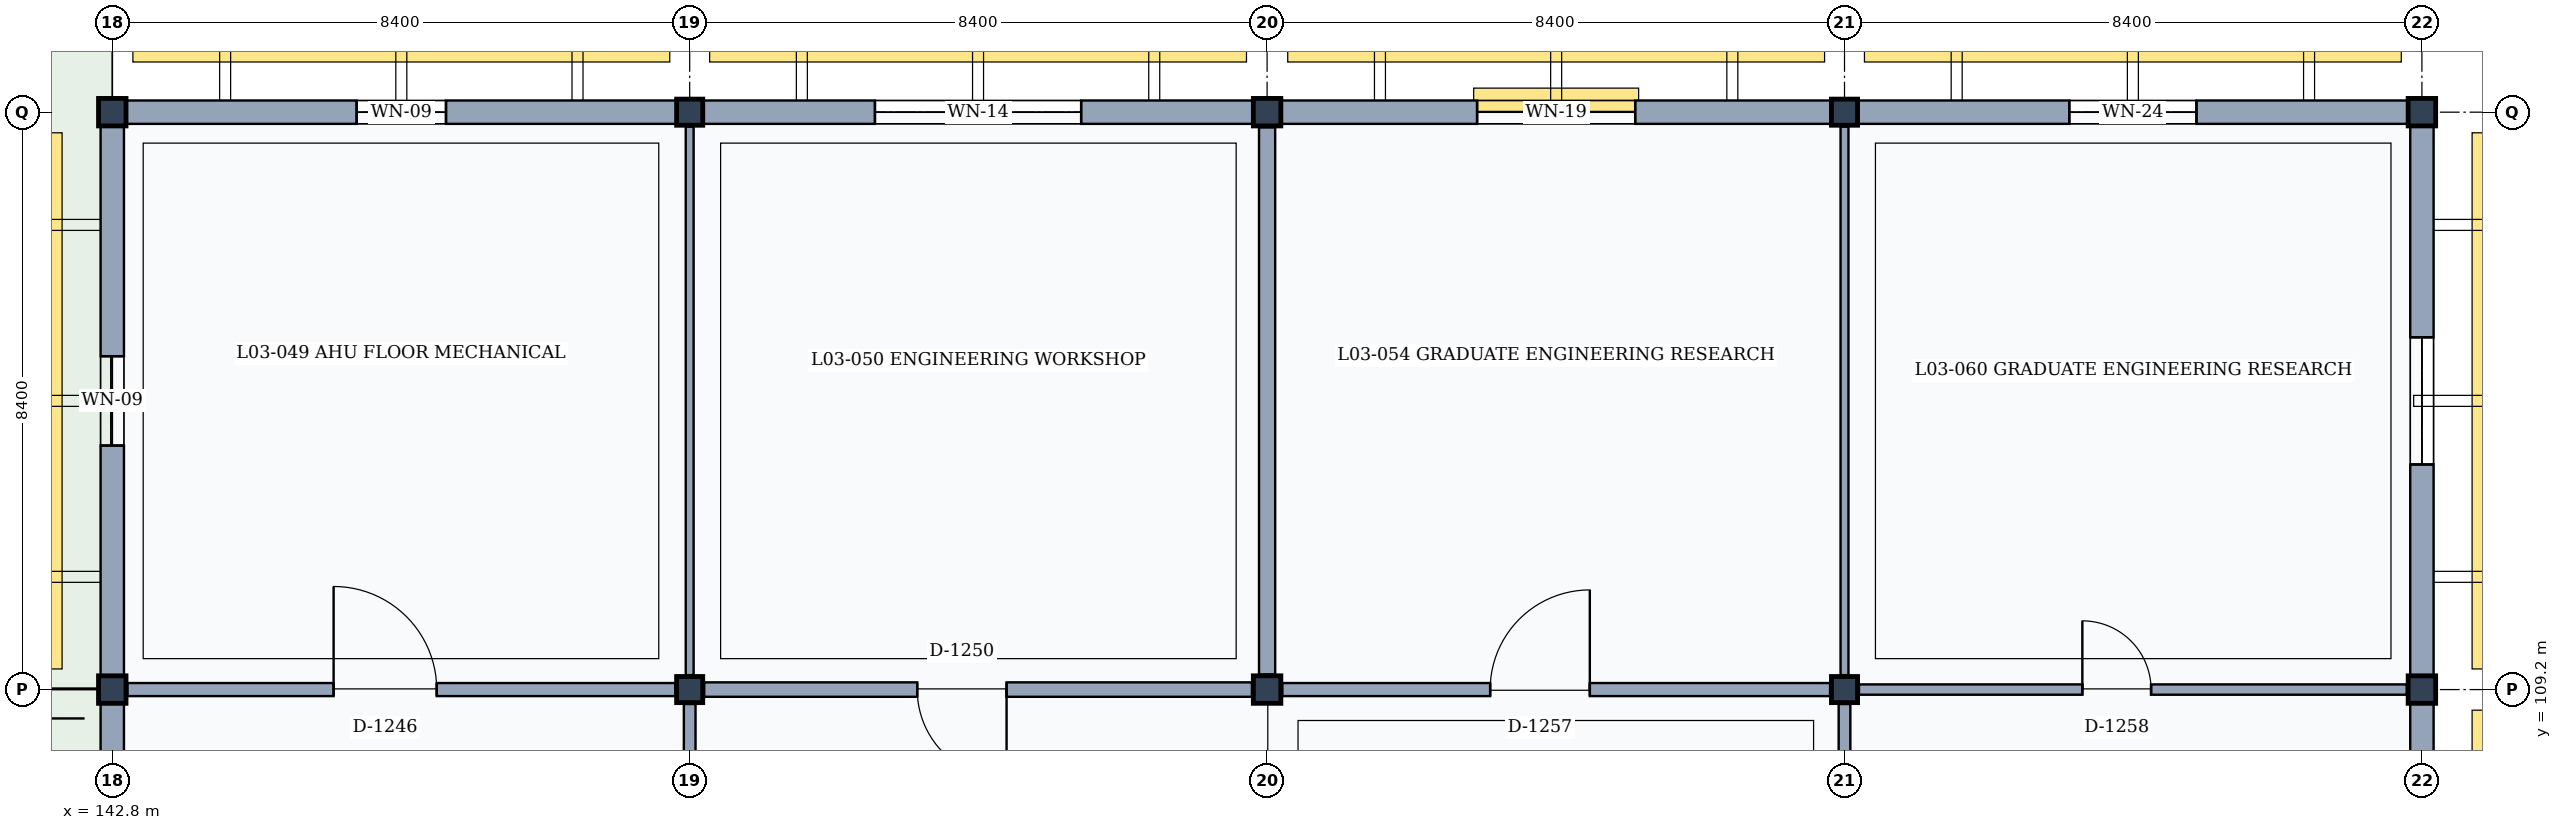
"""IFC4 building model, lengths in metres.
Left out: names, types, materials, properties, quantities, classifications, styles, units other than length and angle.
Written with IfcOpenShell. Run it as: python <this file> out.ifc"""

import sys

from ifc_helpers import new_model, si_unit, direction, frame, frame_2d, origin, origin_2d, place, context, subcontext, project, spatial, rectangle, extrude, element, fill, save


model = new_model("IFC4")
c1 = context("Model", 3, precision=1e-05, world=origin(), true_north=direction((0.0, 1.0)))
c2 = subcontext(c1, "Body", "Model", "MODEL_VIEW")
j1 = project(units=[si_unit("LENGTHUNIT", "METRE"), si_unit("PLANEANGLEUNIT", "RADIAN")], contexts=[c1])
p1 = place(None, origin())
s1 = spatial("IfcSite", under=j1, at=p1, CompositionType="ELEMENT")
p2 = place(p1, origin())
s2 = spatial("IfcBuilding", under=s1, at=p2, CompositionType="ELEMENT")
p3 = place(p2, frame((0.0, 0.0, 13.8)))
s3 = spatial("IfcBuildingStorey", under=s2, at=p3, CompositionType="ELEMENT", Elevation=13.8)
for number, where, z_axis, x_axis in (
    (1, (142.8, 109.2, 0.0), (0.0, 0.0, 1.0), (1.0, 0.0, 0.0)),
    (2, (142.8, 117.6, 0.0), (0.0, 0.0, 1.0), (1.0, 0.0, 0.0)),
):
    element("IfcColumn", number, at=place(p3, frame(where, z_axis=z_axis, x_axis=x_axis)), inside=s3, PredefinedType="COLUMN", context=c2, shape_type="SweptSolid", body=[
        extrude(rectangle(XDim=0.4, YDim=0.4, at=origin_2d()), origin(), (0.0, 0.0, 1.0), 4.2),
    ])
for number, where, z_axis, x_axis in (
    (3, (151.2, 109.2, 0.0), (0.0, 0.0, 1.0), (1.0, 0.0, 0.0)),
    (4, (151.2, 117.6, 0.0), (0.0, 0.0, 1.0), (1.0, 0.0, 0.0)),
):
    element("IfcColumn", number, at=place(p3, frame(where, z_axis=z_axis, x_axis=x_axis)), inside=s3, PredefinedType="COLUMN", context=c2, shape_type="SweptSolid", body=[
        extrude(rectangle(XDim=0.38, YDim=0.38, at=origin_2d()), origin(), (0.0, 0.0, 1.0), 4.2),
    ])
for number, where, z_axis, x_axis in (
    (5, (159.6, 109.2, 0.0), (0.0, 0.0, 1.0), (1.0, 0.0, 0.0)),
    (6, (159.6, 117.6, 0.0), (0.0, 0.0, 1.0), (1.0, 0.0, 0.0)),
):
    element("IfcColumn", number, at=place(p3, frame(where, z_axis=z_axis, x_axis=x_axis)), inside=s3, PredefinedType="COLUMN", context=c2, shape_type="SweptSolid", body=[
        extrude(rectangle(XDim=0.4, YDim=0.4, at=origin_2d()), origin(), (0.0, 0.0, 1.0), 4.2),
    ])
for number, where, z_axis, x_axis in (
    (7, (168.0, 109.2, 0.0), (0.0, 0.0, 1.0), (1.0, 0.0, 0.0)),
    (8, (168.0, 117.6, 0.0), (0.0, 0.0, 1.0), (1.0, 0.0, 0.0)),
):
    element("IfcColumn", number, at=place(p3, frame(where, z_axis=z_axis, x_axis=x_axis)), inside=s3, PredefinedType="COLUMN", context=c2, shape_type="SweptSolid", body=[
        extrude(rectangle(XDim=0.38, YDim=0.38, at=origin_2d()), origin(), (0.0, 0.0, 1.0), 4.2),
    ])
for number, where, z_axis, x_axis in (
    (9, (176.4, 109.2, 0.0), (0.0, 0.0, 1.0), (1.0, 0.0, 0.0)),
    (10, (176.4, 117.6, 0.0), (0.0, 0.0, 1.0), (1.0, 0.0, 0.0)),
):
    element("IfcColumn", number, at=place(p3, frame(where, z_axis=z_axis, x_axis=x_axis)), inside=s3, PredefinedType="COLUMN", context=c2, shape_type="SweptSolid", body=[
        extrude(rectangle(XDim=0.4, YDim=0.4, at=origin_2d()), origin(), (0.0, 0.0, 1.0), 4.2),
    ])
p4 = place(p3, frame((142.8, 101.0, 0.0), z_axis=(0.0, 0.0, 1.0), x_axis=(0.0, 1.0, 0.0)))
e11 = element("IfcWall", 11, at=p4, inside=s3, PredefinedType="SOLIDWALL", context=c2, shape_type="SweptSolid", body=[
    extrude(rectangle(XDim=8.0, YDim=0.34, at=frame_2d((4.0, 0.0))), origin(), (0.0, 0.0, 1.0), 3.36),
])
p5 = place(p4, frame((3.45, 0.0, 0.0)))
e12 = element("IfcOpeningElement", 12, at=p5, cuts=e11, PredefinedType="OPENING", context=c2, shape_type="SweptSolid", body=[
    extrude(rectangle(XDim=1.1, YDim=2.2, at=frame_2d((0.55, 1.1))), frame((0.0, 0.18, 0.0), z_axis=(0.0, -1.0, 0.0), x_axis=(1.0, 0.0, 0.0)), (0.0, 0.0, 1.0), 0.36),
])
p6 = place(p3, frame((143.0, 117.6, 0.0), z_axis=(0.0, 0.0, 1.0), x_axis=(1.0, 0.0, 0.0)))
e13 = element("IfcWall", 13, at=p6, inside=s3, PredefinedType="SOLIDWALL", context=c2, shape_type="SweptSolid", body=[
    extrude(rectangle(XDim=8.01, YDim=0.34, at=frame_2d((4.005, 0.0))), origin(), (0.0, 0.0, 1.0), 3.36),
])
p7 = place(p6, frame((3.355, 0.0, 0.9)))
e14 = element("IfcOpeningElement", 14, at=p7, cuts=e13, PredefinedType="OPENING", context=c2, shape_type="SweptSolid", body=[
    extrude(rectangle(XDim=1.3, YDim=1.75, at=frame_2d((0.65, 0.875))), frame((0.0, 0.18, 0.0), z_axis=(0.0, -1.0, 0.0), x_axis=(1.0, 0.0, 0.0)), (0.0, 0.0, 1.0), 0.36),
])
p8 = place(p3, frame((142.8, 109.4, 0.0), z_axis=(0.0, 0.0, 1.0), x_axis=(0.0, 1.0, 0.0)))
e15 = element("IfcWall", 15, at=p8, inside=s3, PredefinedType="SOLIDWALL", context=c2, shape_type="SweptSolid", body=[
    extrude(rectangle(XDim=8.0, YDim=0.34, at=frame_2d((4.0, 0.0))), origin(), (0.0, 0.0, 1.0), 3.36),
])
p9 = place(p8, frame((3.35, 0.0, 0.9)))
e16 = element("IfcOpeningElement", 16, at=p9, cuts=e15, PredefinedType="OPENING", context=c2, shape_type="SweptSolid", body=[
    extrude(rectangle(XDim=1.3, YDim=1.75, at=frame_2d((0.65, 0.875))), frame((0.0, 0.18, 0.0), z_axis=(0.0, -1.0, 0.0), x_axis=(1.0, 0.0, 0.0)), (0.0, 0.0, 1.0), 0.36),
])
p10 = place(p3, frame((151.39, 117.6, 0.0), z_axis=(0.0, 0.0, 1.0), x_axis=(1.0, 0.0, 0.0)))
e17 = element("IfcWall", 17, at=p10, inside=s3, PredefinedType="SOLIDWALL", context=c2, shape_type="SweptSolid", body=[
    extrude(rectangle(XDim=8.01, YDim=0.34, at=frame_2d((4.005, 0.0))), origin(), (0.0, 0.0, 1.0), 3.36),
])
p11 = place(p10, frame((2.505, 0.0, 0.9)))
e18 = element("IfcOpeningElement", 18, at=p11, cuts=e17, PredefinedType="OPENING", context=c2, shape_type="SweptSolid", body=[
    extrude(rectangle(XDim=3.0, YDim=1.8, at=frame_2d((1.5, 0.9))), frame((0.0, 0.18, 0.0), z_axis=(0.0, -1.0, 0.0), x_axis=(1.0, 0.0, 0.0)), (0.0, 0.0, 1.0), 0.36),
])
p12 = place(p3, frame((159.8, 117.6, 0.0), z_axis=(0.0, 0.0, 1.0), x_axis=(1.0, 0.0, 0.0)))
e19 = element("IfcWall", 19, at=p12, inside=s3, PredefinedType="SOLIDWALL", context=c2, shape_type="SweptSolid", body=[
    extrude(rectangle(XDim=8.01, YDim=0.34, at=frame_2d((4.005, 0.0))), origin(), (0.0, 0.0, 1.0), 3.36),
])
p13 = place(p12, frame((2.855, 0.0, 0.9)))
e20 = element("IfcOpeningElement", 20, at=p13, cuts=e19, PredefinedType="OPENING", context=c2, shape_type="SweptSolid", body=[
    extrude(rectangle(XDim=2.3, YDim=1.5, at=frame_2d((1.15, 0.75))), frame((0.0, 0.18, 0.0), z_axis=(0.0, -1.0, 0.0), x_axis=(1.0, 0.0, 0.0)), (0.0, 0.0, 1.0), 0.36),
])
p14 = place(p3, frame((176.4, 109.0, 0.0), z_axis=(0.0, 0.0, 1.0), x_axis=(0.0, -1.0, 0.0)))
e21 = element("IfcWall", 21, at=p14, inside=s3, PredefinedType="SOLIDWALL", context=c2, shape_type="SweptSolid", body=[
    extrude(rectangle(XDim=8.0, YDim=0.34, at=frame_2d((4.0, 0.0))), origin(), (0.0, 0.0, 1.0), 3.36),
])
p15 = place(p14, frame((3.375, 0.0, 0.9)))
e22 = element("IfcOpeningElement", 22, at=p15, cuts=e21, PredefinedType="OPENING", context=c2, shape_type="SweptSolid", body=[
    extrude(rectangle(XDim=1.25, YDim=1.7, at=frame_2d((0.625, 0.85))), frame((0.0, 0.18, 0.0), z_axis=(0.0, -1.0, 0.0), x_axis=(1.0, 0.0, 0.0)), (0.0, 0.0, 1.0), 0.36),
])
p16 = place(p3, frame((168.19, 117.6, 0.0), z_axis=(0.0, 0.0, 1.0), x_axis=(1.0, 0.0, 0.0)))
e23 = element("IfcWall", 23, at=p16, inside=s3, PredefinedType="SOLIDWALL", context=c2, shape_type="SweptSolid", body=[
    extrude(rectangle(XDim=8.01, YDim=0.34, at=frame_2d((4.005, 0.0))), origin(), (0.0, 0.0, 1.0), 3.36),
])
p17 = place(p16, frame((3.08, 0.0, 0.9)))
e24 = element("IfcOpeningElement", 24, at=p17, cuts=e23, PredefinedType="OPENING", context=c2, shape_type="SweptSolid", body=[
    extrude(rectangle(XDim=1.85, YDim=1.65, at=frame_2d((0.925, 0.825))), frame((0.0, 0.18, 0.0), z_axis=(0.0, -1.0, 0.0), x_axis=(1.0, 0.0, 0.0)), (0.0, 0.0, 1.0), 0.36),
])
p18 = place(p3, frame((176.4, 117.4, 0.0), z_axis=(0.0, 0.0, 1.0), x_axis=(0.0, -1.0, 0.0)))
e25 = element("IfcWall", 25, at=p18, inside=s3, PredefinedType="SOLIDWALL", context=c2, shape_type="SweptSolid", body=[
    extrude(rectangle(XDim=8.0, YDim=0.34, at=frame_2d((4.0, 0.0))), origin(), (0.0, 0.0, 1.0), 3.36),
])
p19 = place(p18, frame((3.075, 0.0, 0.9)))
e26 = element("IfcOpeningElement", 26, at=p19, cuts=e25, PredefinedType="OPENING", context=c2, shape_type="SweptSolid", body=[
    extrude(rectangle(XDim=1.85, YDim=1.65, at=frame_2d((0.925, 0.825))), frame((0.0, 0.18, 0.0), z_axis=(0.0, -1.0, 0.0), x_axis=(1.0, 0.0, 0.0)), (0.0, 0.0, 1.0), 0.36),
])
p20 = place(p3, frame((151.2, 101.01, 0.0), z_axis=(0.0, 0.0, 1.0), x_axis=(0.0, 1.0, 0.0)))
e27 = element("IfcWall", 27, at=p20, inside=s3, PredefinedType="PARTITIONING", context=c2, shape_type="SweptSolid", body=[
    extrude(rectangle(XDim=7.98, YDim=0.17, at=frame_2d((3.99, 0.0))), origin(), (0.0, 0.0, 1.0), 3.32),
])
p21 = place(p20, frame((3.05, 0.0, 0.0)))
e28 = element("IfcOpeningElement", 28, at=p21, cuts=e27, PredefinedType="OPENING", context=c2, shape_type="SweptSolid", body=[
    extrude(rectangle(XDim=1.4, YDim=2.25, at=frame_2d((0.7, 1.125))), frame((0.0, 0.095, 0.0), z_axis=(0.0, -1.0, 0.0), x_axis=(1.0, 0.0, 0.0)), (0.0, 0.0, 1.0), 0.19),
])
p22 = place(p3, frame((143.02, 109.2, 0.0), z_axis=(0.0, 0.0, 1.0), x_axis=(1.0, 0.0, 0.0)))
e29 = element("IfcWall", 29, at=p22, inside=s3, PredefinedType="PARTITIONING", context=c2, shape_type="SweptSolid", body=[
    extrude(rectangle(XDim=7.97, YDim=0.19, at=frame_2d((3.985, 0.0))), origin(), (0.0, 0.0, 1.0), 3.22),
])
p23 = place(p22, frame((3.0, 0.0, 0.0)))
e30 = element("IfcOpeningElement", 30, at=p23, cuts=e29, PredefinedType="OPENING", context=c2, shape_type="SweptSolid", body=[
    extrude(rectangle(XDim=1.5, YDim=2.3, at=frame_2d((0.75, 1.15))), frame((0.0, 0.105, 0.0), z_axis=(0.0, -1.0, 0.0), x_axis=(1.0, 0.0, 0.0)), (0.0, 0.0, 1.0), 0.21),
])
p24 = place(p3, frame((151.2, 109.41, 0.0), z_axis=(0.0, 0.0, 1.0), x_axis=(0.0, 1.0, 0.0)))
e31 = element("IfcWall", 31, at=p24, inside=s3, PredefinedType="PARTITIONING", context=c2, shape_type="SweptSolid", body=[
    extrude(rectangle(XDim=7.98, YDim=0.115, at=frame_2d((3.99, 0.0))), origin(), (0.0, 0.0, 1.0), 3.32),
])
p25 = place(p3, frame((151.41, 109.2, 0.0), z_axis=(0.0, 0.0, 1.0), x_axis=(1.0, 0.0, 0.0)))
e32 = element("IfcWall", 32, at=p25, inside=s3, PredefinedType="PARTITIONING", context=c2, shape_type="SweptSolid", body=[
    extrude(rectangle(XDim=7.97, YDim=0.21, at=frame_2d((3.985, 0.0))), origin(), (0.0, 0.0, 1.0), 3.22),
])
p26 = place(p25, frame((3.1, 0.0, 0.0)))
e33 = element("IfcOpeningElement", 33, at=p26, cuts=e32, PredefinedType="OPENING", context=c2, shape_type="SweptSolid", body=[
    extrude(rectangle(XDim=1.3, YDim=2.2, at=frame_2d((0.65, 1.1))), frame((0.0, 0.115, 0.0), z_axis=(0.0, -1.0, 0.0), x_axis=(1.0, 0.0, 0.0)), (0.0, 0.0, 1.0), 0.23),
])
p27 = place(p3, frame((159.6, 109.42, 0.0), z_axis=(0.0, 0.0, 1.0), x_axis=(0.0, 1.0, 0.0)))
e34 = element("IfcWall", 34, at=p27, inside=s3, PredefinedType="PARTITIONING", context=c2, shape_type="SweptSolid", body=[
    extrude(rectangle(XDim=7.96, YDim=0.235, at=frame_2d((3.98, 0.0))), origin(), (0.0, 0.0, 1.0), 3.32),
])
p28 = place(p3, frame((168.0, 101.01, 0.0), z_axis=(0.0, 0.0, 1.0), x_axis=(0.0, 1.0, 0.0)))
e35 = element("IfcWall", 35, at=p28, inside=s3, PredefinedType="PARTITIONING", context=c2, shape_type="SweptSolid", body=[
    extrude(rectangle(XDim=7.98, YDim=0.17, at=frame_2d((3.99, 0.0))), origin(), (0.0, 0.0, 1.0), 3.32),
])
p29 = place(p28, frame((3.075, 0.0, 0.0)))
e36 = element("IfcOpeningElement", 36, at=p29, cuts=e35, PredefinedType="OPENING", context=c2, shape_type="SweptSolid", body=[
    extrude(rectangle(XDim=1.35, YDim=2.25, at=frame_2d((0.675, 1.125))), frame((0.0, 0.095, 0.0), z_axis=(0.0, -1.0, 0.0), x_axis=(1.0, 0.0, 0.0)), (0.0, 0.0, 1.0), 0.19),
])
p30 = place(p3, frame((159.82, 109.2, 0.0), z_axis=(0.0, 0.0, 1.0), x_axis=(1.0, 0.0, 0.0)))
e37 = element("IfcWall", 37, at=p30, inside=s3, PredefinedType="PARTITIONING", context=c2, shape_type="SweptSolid", body=[
    extrude(rectangle(XDim=7.97, YDim=0.19, at=frame_2d((3.985, 0.0))), origin(), (0.0, 0.0, 1.0), 3.22),
])
p31 = place(p30, frame((3.025, 0.0, 0.0)))
e38 = element("IfcOpeningElement", 38, at=p31, cuts=e37, PredefinedType="OPENING", context=c2, shape_type="SweptSolid", body=[
    extrude(rectangle(XDim=1.45, YDim=2.35, at=frame_2d((0.725, 1.175))), frame((0.0, 0.105, 0.0), z_axis=(0.0, -1.0, 0.0), x_axis=(1.0, 0.0, 0.0)), (0.0, 0.0, 1.0), 0.21),
])
p32 = place(p3, frame((168.0, 109.41, 0.0), z_axis=(0.0, 0.0, 1.0), x_axis=(0.0, 1.0, 0.0)))
e39 = element("IfcWall", 39, at=p32, inside=s3, PredefinedType="PARTITIONING", context=c2, shape_type="SweptSolid", body=[
    extrude(rectangle(XDim=7.98, YDim=0.115, at=frame_2d((3.99, 0.0))), origin(), (0.0, 0.0, 1.0), 3.32),
])
p33 = place(p3, frame((168.21, 109.2, 0.0), z_axis=(0.0, 0.0, 1.0), x_axis=(1.0, 0.0, 0.0)))
e40 = element("IfcWall", 40, at=p33, inside=s3, PredefinedType="PARTITIONING", context=c2, shape_type="SweptSolid", body=[
    extrude(rectangle(XDim=7.97, YDim=0.15, at=frame_2d((3.985, 0.0))), origin(), (0.0, 0.0, 1.0), 3.22),
])
p34 = place(p33, frame((3.25, 0.0, 0.0)))
e41 = element("IfcOpeningElement", 41, at=p34, cuts=e40, PredefinedType="OPENING", context=c2, shape_type="SweptSolid", body=[
    extrude(rectangle(XDim=1.0, YDim=2.15, at=frame_2d((0.5, 1.075))), frame((0.0, 0.085, 0.0), z_axis=(0.0, -1.0, 0.0), x_axis=(1.0, 0.0, 0.0)), (0.0, 0.0, 1.0), 0.17),
])
p35 = place(p7, origin())
e42 = element("IfcWindow", 42, at=p35, inside=s3, PartitioningType="SINGLE_PANEL", PredefinedType="WINDOW", context=c2, shape_type="SweptSolid", body=[
    extrude(rectangle(XDim=1.3, YDim=1.75, at=frame_2d((0.65, 0.875))), frame((0.0, 0.03, 0.0), z_axis=(0.0, -1.0, 0.0), x_axis=(1.0, 0.0, 0.0)), (0.0, 0.0, 1.0), 0.06),
])
fill(e14, e42)
p36 = place(p9, origin())
e43 = element("IfcWindow", 43, at=p36, inside=s3, PartitioningType="SINGLE_PANEL", PredefinedType="WINDOW", context=c2, shape_type="SweptSolid", body=[
    extrude(rectangle(XDim=1.3, YDim=1.75, at=frame_2d((0.65, 0.875))), frame((0.0, 0.03, 0.0), z_axis=(0.0, -1.0, 0.0), x_axis=(1.0, 0.0, 0.0)), (0.0, 0.0, 1.0), 0.06),
])
fill(e16, e43)
p37 = place(p11, origin())
e44 = element("IfcWindow", 44, at=p37, inside=s3, PartitioningType="SINGLE_PANEL", PredefinedType="WINDOW", context=c2, shape_type="SweptSolid", body=[
    extrude(rectangle(XDim=3.0, YDim=1.8, at=frame_2d((1.5, 0.9))), frame((0.0, 0.03, 0.0), z_axis=(0.0, -1.0, 0.0), x_axis=(1.0, 0.0, 0.0)), (0.0, 0.0, 1.0), 0.06),
])
fill(e18, e44)
p38 = place(p13, origin())
e45 = element("IfcWindow", 45, at=p38, inside=s3, PartitioningType="SINGLE_PANEL", PredefinedType="WINDOW", context=c2, shape_type="SweptSolid", body=[
    extrude(rectangle(XDim=2.3, YDim=1.5, at=frame_2d((1.15, 0.75))), frame((0.0, 0.03, 0.0), z_axis=(0.0, -1.0, 0.0), x_axis=(1.0, 0.0, 0.0)), (0.0, 0.0, 1.0), 0.06),
])
fill(e20, e45)
p39 = place(p17, origin())
e46 = element("IfcWindow", 46, at=p39, inside=s3, PartitioningType="SINGLE_PANEL", PredefinedType="WINDOW", context=c2, shape_type="SweptSolid", body=[
    extrude(rectangle(XDim=1.85, YDim=1.65, at=frame_2d((0.925, 0.825))), frame((0.0, 0.03, 0.0), z_axis=(0.0, -1.0, 0.0), x_axis=(1.0, 0.0, 0.0)), (0.0, 0.0, 1.0), 0.06),
])
fill(e24, e46)
p40 = place(p19, origin())
e47 = element("IfcWindow", 47, at=p40, inside=s3, PartitioningType="SINGLE_PANEL", PredefinedType="WINDOW", context=c2, shape_type="SweptSolid", body=[
    extrude(rectangle(XDim=1.85, YDim=1.65, at=frame_2d((0.925, 0.825))), frame((0.0, 0.03, 0.0), z_axis=(0.0, -1.0, 0.0), x_axis=(1.0, 0.0, 0.0)), (0.0, 0.0, 1.0), 0.06),
])
fill(e26, e47)
p41 = place(p23, origin())
e48 = element("IfcDoor", 48, at=p41, inside=s3, OperationType="SINGLE_SWING_LEFT", PredefinedType="DOOR", context=c2, shape_type="SweptSolid", body=[
    extrude(rectangle(XDim=1.5, YDim=2.3, at=frame_2d((0.75, 1.15))), frame((0.0, 0.025, 0.0), z_axis=(0.0, -1.0, 0.0), x_axis=(1.0, 0.0, 0.0)), (0.0, 0.0, 1.0), 0.05),
])
fill(e30, e48)
p42 = place(p26, frame((1.3, 0.0, 0.0), z_axis=(0.0, 0.0, 1.0), x_axis=(-1.0, 0.0, 0.0)))
e49 = element("IfcDoor", 49, at=p42, inside=s3, OperationType="SINGLE_SWING_LEFT", PredefinedType="DOOR", context=c2, shape_type="SweptSolid", body=[
    extrude(rectangle(XDim=1.3, YDim=2.2, at=frame_2d((0.65, 1.1))), frame((0.0, 0.025, 0.0), z_axis=(0.0, -1.0, 0.0), x_axis=(1.0, 0.0, 0.0)), (0.0, 0.0, 1.0), 0.05),
])
fill(e33, e49)
p43 = place(p31, origin())
e50 = element("IfcDoor", 50, at=p43, inside=s3, OperationType="SINGLE_SWING_RIGHT", PredefinedType="DOOR", context=c2, shape_type="SweptSolid", body=[
    extrude(rectangle(XDim=1.45, YDim=2.35, at=frame_2d((0.725, 1.175))), frame((0.0, 0.025, 0.0), z_axis=(0.0, -1.0, 0.0), x_axis=(1.0, 0.0, 0.0)), (0.0, 0.0, 1.0), 0.05),
])
fill(e38, e50)
p44 = place(p34, origin())
e51 = element("IfcDoor", 51, at=p44, inside=s3, OperationType="SINGLE_SWING_LEFT", PredefinedType="DOOR", context=c2, shape_type="SweptSolid", body=[
    extrude(rectangle(XDim=1.0, YDim=2.15, at=frame_2d((0.5, 1.075))), frame((0.0, 0.025, 0.0), z_axis=(0.0, -1.0, 0.0), x_axis=(1.0, 0.0, 0.0)), (0.0, 0.0, 1.0), 0.05),
])
fill(e41, e51)
save(model, sys.argv[1])
